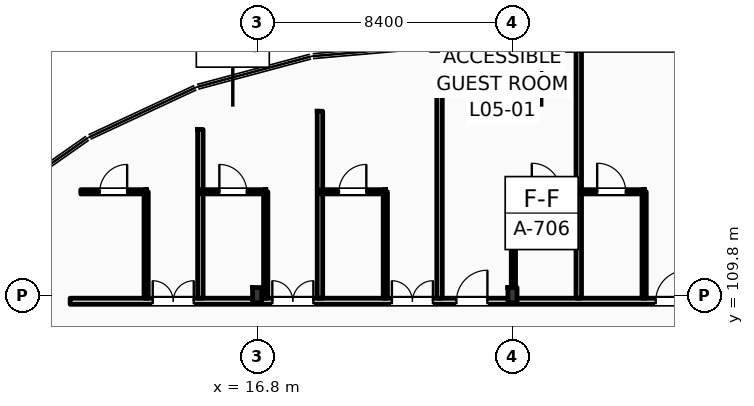
"""IFC4 building model, lengths in metres.
Left out: names, types, materials, properties, quantities, classifications, styles, units other than length and angle.
Written with IfcOpenShell. Run it as: python <this file> out.ifc"""

import sys

from ifc_helpers import new_model, si_unit, direction, frame, frame_2d, origin, origin_2d, place, context, subcontext, project, spatial, rectangle, i_section, extrude, element, fill, save


model = new_model("IFC4")
c1 = context("Model", 3, precision=1e-05, world=origin(), true_north=direction((0.0, 1.0)))
c2 = subcontext(c1, "Body", "Model", "MODEL_VIEW")
j1 = project(units=[si_unit("LENGTHUNIT", "METRE"), si_unit("PLANEANGLEUNIT", "RADIAN")], contexts=[c1])
p1 = place(None, origin())
s1 = spatial("IfcSite", under=j1, at=p1, CompositionType="ELEMENT")
p2 = place(p1, origin())
s2 = spatial("IfcBuilding", under=s1, at=p2, CompositionType="ELEMENT")
p3 = place(p2, frame((0.0, 0.0, 24.6)))
s3 = spatial("IfcBuildingStorey", under=s2, at=p3, CompositionType="ELEMENT", Elevation=24.6)
for number, where, z_axis, x_axis in (
    (1, (16.8, 109.8, 0.0), (0.0, 0.0, 1.0), (1.0, 0.0, 0.0)),
    (2, (25.2, 109.8, 0.0), (0.0, 0.0, 1.0), (1.0, 0.0, 0.0)),
):
    element("IfcColumn", number, at=place(p3, frame(where, z_axis=z_axis, x_axis=x_axis)), inside=s3, PredefinedType="COLUMN", context=c2, shape_type="SweptSolid", body=[
        extrude(i_section(OverallWidth=0.3, OverallDepth=0.5, WebThickness=0.014, FlangeThickness=0.028, FilletRadius=0.027, at=origin_2d()), origin(), (0.0, 0.0, 1.0), 3.6),
    ])
p4 = place(p3, frame((25.2, 118.0, 0.0), z_axis=(0.0, 0.0, 1.0), x_axis=(1.0, 0.0, 0.0)))
e3 = element("IfcColumn", 3, at=p4, inside=s3, PredefinedType="COLUMN", context=c2, shape_type="SweptSolid", body=[
    extrude(i_section(OverallWidth=0.3, OverallDepth=0.45, WebThickness=0.014, FlangeThickness=0.026, FilletRadius=0.027, at=origin_2d()), origin(), (0.0, 0.0, 1.0), 3.6),
])
p5 = place(p3, frame((10.65, 109.6, 0.0), z_axis=(0.0, 0.0, 1.0), x_axis=(1.0, 0.0, 0.0)))
e4 = element("IfcWall", 4, at=p5, inside=s3, PredefinedType="PARTITIONING", context=c2, shape_type="SweptSolid", body=[
    extrude(rectangle(XDim=109.21, YDim=0.2, at=frame_2d((54.605, 0.0))), origin(), (0.0, 0.0, 1.0), 2.78),
])
p6 = place(p5, frame((12.705, 0.0, 0.0)))
e5 = element("IfcOpeningElement", 5, at=p6, cuts=e4, PredefinedType="OPENING", context=c2, shape_type="SweptSolid", body=[
    extrude(rectangle(XDim=1.02, YDim=2.2, at=frame_2d((0.51, 1.1))), frame((0.0, 0.11, 0.0), z_axis=(0.0, -1.0, 0.0), x_axis=(1.0, 0.0, 0.0)), (0.0, 0.0, 1.0), 0.22),
])
p7 = place(p5, frame((19.26, 0.0, 0.0)))
e6 = element("IfcOpeningElement", 6, at=p7, cuts=e4, PredefinedType="OPENING", context=c2, shape_type="SweptSolid", body=[
    extrude(rectangle(XDim=1.02, YDim=2.2, at=frame_2d((0.51, 1.1))), frame((0.0, 0.11, 0.0), z_axis=(0.0, -1.0, 0.0), x_axis=(1.0, 0.0, 0.0)), (0.0, 0.0, 1.0), 0.22),
])
p8 = place(p5, frame((23.71, 0.0, 0.0)))
e7 = element("IfcOpeningElement", 7, at=p8, cuts=e4, PredefinedType="OPENING", context=c2, shape_type="SweptSolid", body=[
    extrude(rectangle(XDim=1.02, YDim=2.2, at=frame_2d((0.51, 1.1))), frame((0.0, 0.11, 0.0), z_axis=(0.0, -1.0, 0.0), x_axis=(1.0, 0.0, 0.0)), (0.0, 0.0, 1.0), 0.22),
])
p9 = place(p5, frame((27.66, 0.0, 0.0)))
e8 = element("IfcOpeningElement", 8, at=p9, cuts=e4, PredefinedType="OPENING", context=c2, shape_type="SweptSolid", body=[
    extrude(rectangle(XDim=1.02, YDim=2.2, at=frame_2d((0.51, 1.1))), frame((0.0, 0.11, 0.0), z_axis=(0.0, -1.0, 0.0), x_axis=(1.0, 0.0, 0.0)), (0.0, 0.0, 1.0), 0.22),
])
p10 = place(p5, frame((31.89, 0.0, 0.0)))
e9 = element("IfcOpeningElement", 9, at=p10, cuts=e4, PredefinedType="OPENING", context=c2, shape_type="SweptSolid", body=[
    extrude(rectangle(XDim=0.96, YDim=2.2, at=frame_2d((0.48, 1.1))), frame((0.0, 0.11, 0.0), z_axis=(0.0, -1.0, 0.0), x_axis=(1.0, 0.0, 0.0)), (0.0, 0.0, 1.0), 0.22),
])
p11 = place(p5, frame((33.94, 0.0, 0.0)))
e10 = element("IfcOpeningElement", 10, at=p11, cuts=e4, PredefinedType="OPENING", context=c2, shape_type="SweptSolid", body=[
    extrude(rectangle(XDim=0.96, YDim=2.2, at=frame_2d((0.48, 1.1))), frame((0.0, 0.11, 0.0), z_axis=(0.0, -1.0, 0.0), x_axis=(1.0, 0.0, 0.0)), (0.0, 0.0, 1.0), 0.22),
])
p12 = place(p5, frame((40.29, 0.0, 0.0)))
e11 = element("IfcOpeningElement", 11, at=p12, cuts=e4, PredefinedType="OPENING", context=c2, shape_type="SweptSolid", body=[
    extrude(rectangle(XDim=0.96, YDim=2.2, at=frame_2d((0.48, 1.1))), frame((0.0, 0.11, 0.0), z_axis=(0.0, -1.0, 0.0), x_axis=(1.0, 0.0, 0.0)), (0.0, 0.0, 1.0), 0.22),
])
p13 = place(p5, frame((42.34, 0.0, 0.0)))
e12 = element("IfcOpeningElement", 12, at=p13, cuts=e4, PredefinedType="OPENING", context=c2, shape_type="SweptSolid", body=[
    extrude(rectangle(XDim=0.96, YDim=2.2, at=frame_2d((0.48, 1.1))), frame((0.0, 0.11, 0.0), z_axis=(0.0, -1.0, 0.0), x_axis=(1.0, 0.0, 0.0)), (0.0, 0.0, 1.0), 0.22),
])
p14 = place(p5, frame((48.69, 0.0, 0.0)))
e13 = element("IfcOpeningElement", 13, at=p14, cuts=e4, PredefinedType="OPENING", context=c2, shape_type="SweptSolid", body=[
    extrude(rectangle(XDim=0.96, YDim=2.2, at=frame_2d((0.48, 1.1))), frame((0.0, 0.11, 0.0), z_axis=(0.0, -1.0, 0.0), x_axis=(1.0, 0.0, 0.0)), (0.0, 0.0, 1.0), 0.22),
])
p15 = place(p5, frame((50.74, 0.0, 0.0)))
e14 = element("IfcOpeningElement", 14, at=p15, cuts=e4, PredefinedType="OPENING", context=c2, shape_type="SweptSolid", body=[
    extrude(rectangle(XDim=0.96, YDim=2.2, at=frame_2d((0.48, 1.1))), frame((0.0, 0.11, 0.0), z_axis=(0.0, -1.0, 0.0), x_axis=(1.0, 0.0, 0.0)), (0.0, 0.0, 1.0), 0.22),
])
p16 = place(p5, frame((57.09, 0.0, 0.0)))
e15 = element("IfcOpeningElement", 15, at=p16, cuts=e4, PredefinedType="OPENING", context=c2, shape_type="SweptSolid", body=[
    extrude(rectangle(XDim=0.96, YDim=2.2, at=frame_2d((0.48, 1.1))), frame((0.0, 0.11, 0.0), z_axis=(0.0, -1.0, 0.0), x_axis=(1.0, 0.0, 0.0)), (0.0, 0.0, 1.0), 0.22),
])
p17 = place(p5, frame((59.14, 0.0, 0.0)))
e16 = element("IfcOpeningElement", 16, at=p17, cuts=e4, PredefinedType="OPENING", context=c2, shape_type="SweptSolid", body=[
    extrude(rectangle(XDim=0.96, YDim=2.2, at=frame_2d((0.48, 1.1))), frame((0.0, 0.11, 0.0), z_axis=(0.0, -1.0, 0.0), x_axis=(1.0, 0.0, 0.0)), (0.0, 0.0, 1.0), 0.22),
])
p18 = place(p5, frame((65.49, 0.0, 0.0)))
e17 = element("IfcOpeningElement", 17, at=p18, cuts=e4, PredefinedType="OPENING", context=c2, shape_type="SweptSolid", body=[
    extrude(rectangle(XDim=0.96, YDim=2.2, at=frame_2d((0.48, 1.1))), frame((0.0, 0.11, 0.0), z_axis=(0.0, -1.0, 0.0), x_axis=(1.0, 0.0, 0.0)), (0.0, 0.0, 1.0), 0.22),
])
p19 = place(p5, frame((67.54, 0.0, 0.0)))
e18 = element("IfcOpeningElement", 18, at=p19, cuts=e4, PredefinedType="OPENING", context=c2, shape_type="SweptSolid", body=[
    extrude(rectangle(XDim=0.96, YDim=2.2, at=frame_2d((0.48, 1.1))), frame((0.0, 0.11, 0.0), z_axis=(0.0, -1.0, 0.0), x_axis=(1.0, 0.0, 0.0)), (0.0, 0.0, 1.0), 0.22),
])
p20 = place(p5, frame((73.89, 0.0, 0.0)))
e19 = element("IfcOpeningElement", 19, at=p20, cuts=e4, PredefinedType="OPENING", context=c2, shape_type="SweptSolid", body=[
    extrude(rectangle(XDim=0.96, YDim=2.2, at=frame_2d((0.48, 1.1))), frame((0.0, 0.11, 0.0), z_axis=(0.0, -1.0, 0.0), x_axis=(1.0, 0.0, 0.0)), (0.0, 0.0, 1.0), 0.22),
])
p21 = place(p5, frame((78.09, 0.0, 0.0)))
e20 = element("IfcOpeningElement", 20, at=p21, cuts=e4, PredefinedType="OPENING", context=c2, shape_type="SweptSolid", body=[
    extrude(rectangle(XDim=0.96, YDim=2.2, at=frame_2d((0.48, 1.1))), frame((0.0, 0.11, 0.0), z_axis=(0.0, -1.0, 0.0), x_axis=(1.0, 0.0, 0.0)), (0.0, 0.0, 1.0), 0.22),
])
p22 = place(p5, frame((82.29, 0.0, 0.0)))
e21 = element("IfcOpeningElement", 21, at=p22, cuts=e4, PredefinedType="OPENING", context=c2, shape_type="SweptSolid", body=[
    extrude(rectangle(XDim=0.96, YDim=2.2, at=frame_2d((0.48, 1.1))), frame((0.0, 0.11, 0.0), z_axis=(0.0, -1.0, 0.0), x_axis=(1.0, 0.0, 0.0)), (0.0, 0.0, 1.0), 0.22),
])
p23 = place(p5, frame((86.49, 0.0, 0.0)))
e22 = element("IfcOpeningElement", 22, at=p23, cuts=e4, PredefinedType="OPENING", context=c2, shape_type="SweptSolid", body=[
    extrude(rectangle(XDim=0.96, YDim=2.2, at=frame_2d((0.48, 1.1))), frame((0.0, 0.11, 0.0), z_axis=(0.0, -1.0, 0.0), x_axis=(1.0, 0.0, 0.0)), (0.0, 0.0, 1.0), 0.22),
])
p24 = place(p5, frame((88.54, 0.0, 0.0)))
e23 = element("IfcOpeningElement", 23, at=p24, cuts=e4, PredefinedType="OPENING", context=c2, shape_type="SweptSolid", body=[
    extrude(rectangle(XDim=0.96, YDim=2.2, at=frame_2d((0.48, 1.1))), frame((0.0, 0.11, 0.0), z_axis=(0.0, -1.0, 0.0), x_axis=(1.0, 0.0, 0.0)), (0.0, 0.0, 1.0), 0.22),
])
p25 = place(p5, frame((94.89, 0.0, 0.0)))
e24 = element("IfcOpeningElement", 24, at=p25, cuts=e4, PredefinedType="OPENING", context=c2, shape_type="SweptSolid", body=[
    extrude(rectangle(XDim=0.96, YDim=2.2, at=frame_2d((0.48, 1.1))), frame((0.0, 0.11, 0.0), z_axis=(0.0, -1.0, 0.0), x_axis=(1.0, 0.0, 0.0)), (0.0, 0.0, 1.0), 0.22),
])
p26 = place(p5, frame((96.94, 0.0, 0.0)))
e25 = element("IfcOpeningElement", 25, at=p26, cuts=e4, PredefinedType="OPENING", context=c2, shape_type="SweptSolid", body=[
    extrude(rectangle(XDim=0.96, YDim=2.2, at=frame_2d((0.48, 1.1))), frame((0.0, 0.11, 0.0), z_axis=(0.0, -1.0, 0.0), x_axis=(1.0, 0.0, 0.0)), (0.0, 0.0, 1.0), 0.22),
])
p27 = place(p5, frame((103.29, 0.0, 0.0)))
e26 = element("IfcOpeningElement", 26, at=p27, cuts=e4, PredefinedType="OPENING", context=c2, shape_type="SweptSolid", body=[
    extrude(rectangle(XDim=0.96, YDim=2.2, at=frame_2d((0.48, 1.1))), frame((0.0, 0.11, 0.0), z_axis=(0.0, -1.0, 0.0), x_axis=(1.0, 0.0, 0.0)), (0.0, 0.0, 1.0), 0.22),
])
p28 = place(p5, frame((105.25, 0.0, 0.0)))
e27 = element("IfcOpeningElement", 27, at=p28, cuts=e4, PredefinedType="OPENING", context=c2, shape_type="SweptSolid", body=[
    extrude(rectangle(XDim=0.96, YDim=2.2, at=frame_2d((0.48, 1.1))), frame((0.0, 0.11, 0.0), z_axis=(0.0, -1.0, 0.0), x_axis=(1.0, 0.0, 0.0)), (0.0, 0.0, 1.0), 0.22),
])
p29 = place(p5, frame((2.716, 0.0, 0.0)))
e28 = element("IfcOpeningElement", 28, at=p29, cuts=e4, PredefinedType="OPENING", context=c2, shape_type="SweptSolid", body=[
    extrude(rectangle(XDim=1.35, YDim=2.25, at=frame_2d((0.675, 1.125))), frame((0.0, 0.11, 0.0), z_axis=(0.0, -1.0, 0.0), x_axis=(1.0, 0.0, 0.0)), (0.0, 0.0, 1.0), 0.22),
])
p30 = place(p5, frame((6.65, 0.0, 0.0)))
e29 = element("IfcOpeningElement", 29, at=p30, cuts=e4, PredefinedType="OPENING", context=c2, shape_type="SweptSolid", body=[
    extrude(rectangle(XDim=1.35, YDim=2.25, at=frame_2d((0.675, 1.125))), frame((0.0, 0.11, 0.0), z_axis=(0.0, -1.0, 0.0), x_axis=(1.0, 0.0, 0.0)), (0.0, 0.0, 1.0), 0.22),
])
p31 = place(p5, frame((10.583, 0.0, 0.0)))
e30 = element("IfcOpeningElement", 30, at=p31, cuts=e4, PredefinedType="OPENING", context=c2, shape_type="SweptSolid", body=[
    extrude(rectangle(XDim=1.35, YDim=2.25, at=frame_2d((0.675, 1.125))), frame((0.0, 0.11, 0.0), z_axis=(0.0, -1.0, 0.0), x_axis=(1.0, 0.0, 0.0)), (0.0, 0.0, 1.0), 0.22),
])
p32 = place(p3, frame((27.38, 109.7, 0.0), z_axis=(0.0, 0.0, 1.0), x_axis=(0.0, 1.0, 0.0)))
e31 = element("IfcWall", 31, at=p32, inside=s3, PredefinedType="PARTITIONING", context=c2, shape_type="SweptSolid", body=[
    extrude(rectangle(XDim=8.15, YDim=0.18, at=frame_2d((4.075, 0.0))), origin(), (0.0, 0.0, 1.0), 3.34),
])
p33 = place(p3, frame((25.23, 109.7, 0.0), z_axis=(0.0, 0.0, 1.0), x_axis=(0.0, 1.0, 0.0)))
e32 = element("IfcWall", 32, at=p33, inside=s3, PredefinedType="PARTITIONING", context=c2, shape_type="SweptSolid", body=[
    extrude(rectangle(XDim=3.5, YDim=0.14, at=frame_2d((1.75, 0.0))), origin(), (0.0, 0.0, 1.0), 2.93),
])
p34 = place(p3, frame((25.23, 113.2, 0.0), z_axis=(0.0, 0.0, 1.0), x_axis=(1.0, 0.0, 0.0)))
e33 = element("IfcWall", 33, at=p34, inside=s3, PredefinedType="PARTITIONING", context=c2, shape_type="SweptSolid", body=[
    extrude(rectangle(XDim=2.15, YDim=0.14, at=frame_2d((1.075, 0.0))), origin(), (0.0, 0.0, 1.0), 3.34),
])
p35 = place(p34, frame((0.605, 0.0, 0.0)))
e34 = element("IfcOpeningElement", 34, at=p35, cuts=e33, PredefinedType="OPENING", context=c2, shape_type="SweptSolid", body=[
    extrude(rectangle(XDim=0.94, YDim=2.15, at=frame_2d((0.47, 1.075))), frame((0.0, 0.08, 0.0), z_axis=(0.0, -1.0, 0.0), x_axis=(1.0, 0.0, 0.0)), (0.0, 0.0, 1.0), 0.16),
])
p36 = place(p3, frame((29.53, 109.7, 0.0), z_axis=(0.0, 0.0, 1.0), x_axis=(0.0, 1.0, 0.0)))
e35 = element("IfcWall", 35, at=p36, inside=s3, PredefinedType="PARTITIONING", context=c2, shape_type="SweptSolid", body=[
    extrude(rectangle(XDim=3.5, YDim=0.14, at=frame_2d((1.75, 0.0))), origin(), (0.0, 0.0, 1.0), 3.34),
])
p37 = place(p3, frame((27.38, 113.2, 0.0), z_axis=(0.0, 0.0, 1.0), x_axis=(1.0, 0.0, 0.0)))
e36 = element("IfcWall", 36, at=p37, inside=s3, PredefinedType="PARTITIONING", context=c2, shape_type="SweptSolid", body=[
    extrude(rectangle(XDim=2.15, YDim=0.14, at=frame_2d((1.075, 0.0))), origin(), (0.0, 0.0, 1.0), 3.34),
])
p38 = place(p37, frame((0.605, 0.0, 0.0)))
e37 = element("IfcOpeningElement", 37, at=p38, cuts=e36, PredefinedType="OPENING", context=c2, shape_type="SweptSolid", body=[
    extrude(rectangle(XDim=0.94, YDim=2.15, at=frame_2d((0.47, 1.075))), frame((0.0, 0.08, 0.0), z_axis=(0.0, -1.0, 0.0), x_axis=(1.0, 0.0, 0.0)), (0.0, 0.0, 1.0), 0.16),
])
p39 = place(p3, frame((14.933, 109.7, 0.0), z_axis=(0.0, 0.0, 1.0), x_axis=(0.0, 1.0, 0.0)))
e38 = element("IfcWall", 38, at=p39, inside=s3, PredefinedType="PARTITIONING", context=c2, shape_type="SweptSolid", body=[
    extrude(rectangle(XDim=5.55, YDim=0.18, at=frame_2d((2.775, 0.0))), origin(), (0.0, 0.0, 1.0), 3.34),
])
p40 = place(p3, frame((13.15, 109.7, 0.0), z_axis=(0.0, 0.0, 1.0), x_axis=(0.0, 1.0, 0.0)))
e39 = element("IfcWall", 39, at=p40, inside=s3, PredefinedType="PARTITIONING", context=c2, shape_type="SweptSolid", body=[
    extrude(rectangle(XDim=3.5, YDim=0.14, at=frame_2d((1.75, 0.0))), origin(), (0.0, 0.0, 1.0), 3.34),
])
p41 = place(p3, frame((11.0, 113.2, 0.0), z_axis=(0.0, 0.0, 1.0), x_axis=(1.0, 0.0, 0.0)))
e40 = element("IfcWall", 40, at=p41, inside=s3, PredefinedType="PARTITIONING", context=c2, shape_type="SweptSolid", body=[
    extrude(rectangle(XDim=2.15, YDim=0.14, at=frame_2d((1.075, 0.0))), origin(), (0.0, 0.0, 1.0), 3.34),
])
p42 = place(p41, frame((0.625, 0.0, 0.0)))
e41 = element("IfcOpeningElement", 41, at=p42, cuts=e40, PredefinedType="OPENING", context=c2, shape_type="SweptSolid", body=[
    extrude(rectangle(XDim=0.9, YDim=2.1, at=frame_2d((0.45, 1.05))), frame((0.0, 0.08, 0.0), z_axis=(0.0, -1.0, 0.0), x_axis=(1.0, 0.0, 0.0)), (0.0, 0.0, 1.0), 0.16),
])
p43 = place(p3, frame((18.867, 109.7, 0.0), z_axis=(0.0, 0.0, 1.0), x_axis=(0.0, 1.0, 0.0)))
e42 = element("IfcWall", 42, at=p43, inside=s3, PredefinedType="PARTITIONING", context=c2, shape_type="SweptSolid", body=[
    extrude(rectangle(XDim=6.15, YDim=0.18, at=frame_2d((3.075, 0.0))), origin(), (0.0, 0.0, 1.0), 3.34),
])
p44 = place(p3, frame((17.083, 109.7, 0.0), z_axis=(0.0, 0.0, 1.0), x_axis=(0.0, 1.0, 0.0)))
e43 = element("IfcWall", 43, at=p44, inside=s3, PredefinedType="PARTITIONING", context=c2, shape_type="SweptSolid", body=[
    extrude(rectangle(XDim=3.5, YDim=0.14, at=frame_2d((1.75, 0.0))), origin(), (0.0, 0.0, 1.0), 3.34),
])
p45 = place(p3, frame((14.933, 113.2, 0.0), z_axis=(0.0, 0.0, 1.0), x_axis=(1.0, 0.0, 0.0)))
e44 = element("IfcWall", 44, at=p45, inside=s3, PredefinedType="PARTITIONING", context=c2, shape_type="SweptSolid", body=[
    extrude(rectangle(XDim=2.15, YDim=0.14, at=frame_2d((1.075, 0.0))), origin(), (0.0, 0.0, 1.0), 3.34),
])
p46 = place(p45, frame((0.625, 0.0, 0.0)))
e45 = element("IfcOpeningElement", 45, at=p46, cuts=e44, PredefinedType="OPENING", context=c2, shape_type="SweptSolid", body=[
    extrude(rectangle(XDim=0.9, YDim=2.1, at=frame_2d((0.45, 1.05))), frame((0.0, 0.08, 0.0), z_axis=(0.0, -1.0, 0.0), x_axis=(1.0, 0.0, 0.0)), (0.0, 0.0, 1.0), 0.16),
])
p47 = place(p3, frame((22.8, 109.7, 0.0), z_axis=(0.0, 0.0, 1.0), x_axis=(0.0, 1.0, 0.0)))
e46 = element("IfcWall", 46, at=p47, inside=s3, PredefinedType="PARTITIONING", context=c2, shape_type="SweptSolid", body=[
    extrude(rectangle(XDim=7.2, YDim=0.18, at=frame_2d((3.6, 0.0))), origin(), (0.0, 0.0, 1.0), 3.34),
])
p48 = place(p3, frame((21.017, 109.7, 0.0), z_axis=(0.0, 0.0, 1.0), x_axis=(0.0, 1.0, 0.0)))
e47 = element("IfcWall", 47, at=p48, inside=s3, PredefinedType="PARTITIONING", context=c2, shape_type="SweptSolid", body=[
    extrude(rectangle(XDim=3.5, YDim=0.14, at=frame_2d((1.75, 0.0))), origin(), (0.0, 0.0, 1.0), 3.34),
])
p49 = place(p3, frame((18.867, 113.2, 0.0), z_axis=(0.0, 0.0, 1.0), x_axis=(1.0, 0.0, 0.0)))
e48 = element("IfcWall", 48, at=p49, inside=s3, PredefinedType="PARTITIONING", context=c2, shape_type="SweptSolid", body=[
    extrude(rectangle(XDim=2.15, YDim=0.14, at=frame_2d((1.075, 0.0))), origin(), (0.0, 0.0, 1.0), 3.34),
])
p50 = place(p49, frame((0.625, 0.0, 0.0)))
e49 = element("IfcOpeningElement", 49, at=p50, cuts=e48, PredefinedType="OPENING", context=c2, shape_type="SweptSolid", body=[
    extrude(rectangle(XDim=0.9, YDim=2.1, at=frame_2d((0.45, 1.05))), frame((0.0, 0.08, 0.0), z_axis=(0.0, -1.0, 0.0), x_axis=(1.0, 0.0, 0.0)), (0.0, 0.0, 1.0), 0.16),
])
p51 = place(p6, origin())
e50 = element("IfcDoor", 50, at=p51, inside=s3, OperationType="SINGLE_SWING_RIGHT", PredefinedType="DOOR", context=c2, shape_type="SweptSolid", body=[
    extrude(rectangle(XDim=1.02, YDim=2.2, at=frame_2d((0.51, 1.1))), frame((0.0, 0.025, 0.0), z_axis=(0.0, -1.0, 0.0), x_axis=(1.0, 0.0, 0.0)), (0.0, 0.0, 1.0), 0.05),
])
fill(e5, e50)
p52 = place(p35, origin())
e51 = element("IfcDoor", 51, at=p52, inside=s3, OperationType="SINGLE_SWING_LEFT", PredefinedType="DOOR", context=c2, shape_type="SweptSolid", body=[
    extrude(rectangle(XDim=0.94, YDim=2.15, at=frame_2d((0.47, 1.075))), frame((0.0, 0.025, 0.0), z_axis=(0.0, -1.0, 0.0), x_axis=(1.0, 0.0, 0.0)), (0.0, 0.0, 1.0), 0.05),
])
fill(e34, e51)
p53 = place(p7, origin())
e52 = element("IfcDoor", 52, at=p53, inside=s3, OperationType="SINGLE_SWING_RIGHT", PredefinedType="DOOR", context=c2, shape_type="SweptSolid", body=[
    extrude(rectangle(XDim=1.02, YDim=2.2, at=frame_2d((0.51, 1.1))), frame((0.0, 0.025, 0.0), z_axis=(0.0, -1.0, 0.0), x_axis=(1.0, 0.0, 0.0)), (0.0, 0.0, 1.0), 0.05),
])
fill(e6, e52)
p54 = place(p38, origin())
e53 = element("IfcDoor", 53, at=p54, inside=s3, OperationType="SINGLE_SWING_LEFT", PredefinedType="DOOR", context=c2, shape_type="SweptSolid", body=[
    extrude(rectangle(XDim=0.94, YDim=2.15, at=frame_2d((0.47, 1.075))), frame((0.0, 0.025, 0.0), z_axis=(0.0, -1.0, 0.0), x_axis=(1.0, 0.0, 0.0)), (0.0, 0.0, 1.0), 0.05),
])
fill(e37, e53)
p55 = place(p29, origin())
e54 = element("IfcDoor", 54, at=p55, inside=s3, OperationType="DOUBLE_SWING_LEFT", PredefinedType="DOOR", context=c2, shape_type="SweptSolid", body=[
    extrude(rectangle(XDim=1.35, YDim=2.25, at=frame_2d((0.675, 1.125))), frame((0.0, 0.025, 0.0), z_axis=(0.0, -1.0, 0.0), x_axis=(1.0, 0.0, 0.0)), (0.0, 0.0, 1.0), 0.05),
])
fill(e28, e54)
p56 = place(p42, origin())
e55 = element("IfcDoor", 55, at=p56, inside=s3, OperationType="SINGLE_SWING_RIGHT", PredefinedType="DOOR", context=c2, shape_type="SweptSolid", body=[
    extrude(rectangle(XDim=0.9, YDim=2.1, at=frame_2d((0.45, 1.05))), frame((0.0, 0.025, 0.0), z_axis=(0.0, -1.0, 0.0), x_axis=(1.0, 0.0, 0.0)), (0.0, 0.0, 1.0), 0.05),
])
fill(e41, e55)
p57 = place(p30, origin())
e56 = element("IfcDoor", 56, at=p57, inside=s3, OperationType="DOUBLE_SWING_LEFT", PredefinedType="DOOR", context=c2, shape_type="SweptSolid", body=[
    extrude(rectangle(XDim=1.35, YDim=2.25, at=frame_2d((0.675, 1.125))), frame((0.0, 0.025, 0.0), z_axis=(0.0, -1.0, 0.0), x_axis=(1.0, 0.0, 0.0)), (0.0, 0.0, 1.0), 0.05),
])
fill(e29, e56)
p58 = place(p46, origin())
e57 = element("IfcDoor", 57, at=p58, inside=s3, OperationType="SINGLE_SWING_LEFT", PredefinedType="DOOR", context=c2, shape_type="SweptSolid", body=[
    extrude(rectangle(XDim=0.9, YDim=2.1, at=frame_2d((0.45, 1.05))), frame((0.0, 0.025, 0.0), z_axis=(0.0, -1.0, 0.0), x_axis=(1.0, 0.0, 0.0)), (0.0, 0.0, 1.0), 0.05),
])
fill(e45, e57)
p59 = place(p31, origin())
e58 = element("IfcDoor", 58, at=p59, inside=s3, OperationType="DOUBLE_SWING_LEFT", PredefinedType="DOOR", context=c2, shape_type="SweptSolid", body=[
    extrude(rectangle(XDim=1.35, YDim=2.25, at=frame_2d((0.675, 1.125))), frame((0.0, 0.025, 0.0), z_axis=(0.0, -1.0, 0.0), x_axis=(1.0, 0.0, 0.0)), (0.0, 0.0, 1.0), 0.05),
])
fill(e30, e58)
p60 = place(p50, origin())
e59 = element("IfcDoor", 59, at=p60, inside=s3, OperationType="SINGLE_SWING_RIGHT", PredefinedType="DOOR", context=c2, shape_type="SweptSolid", body=[
    extrude(rectangle(XDim=0.9, YDim=2.1, at=frame_2d((0.45, 1.05))), frame((0.0, 0.025, 0.0), z_axis=(0.0, -1.0, 0.0), x_axis=(1.0, 0.0, 0.0)), (0.0, 0.0, 1.0), 0.05),
])
fill(e49, e59)
save(model, sys.argv[1])
